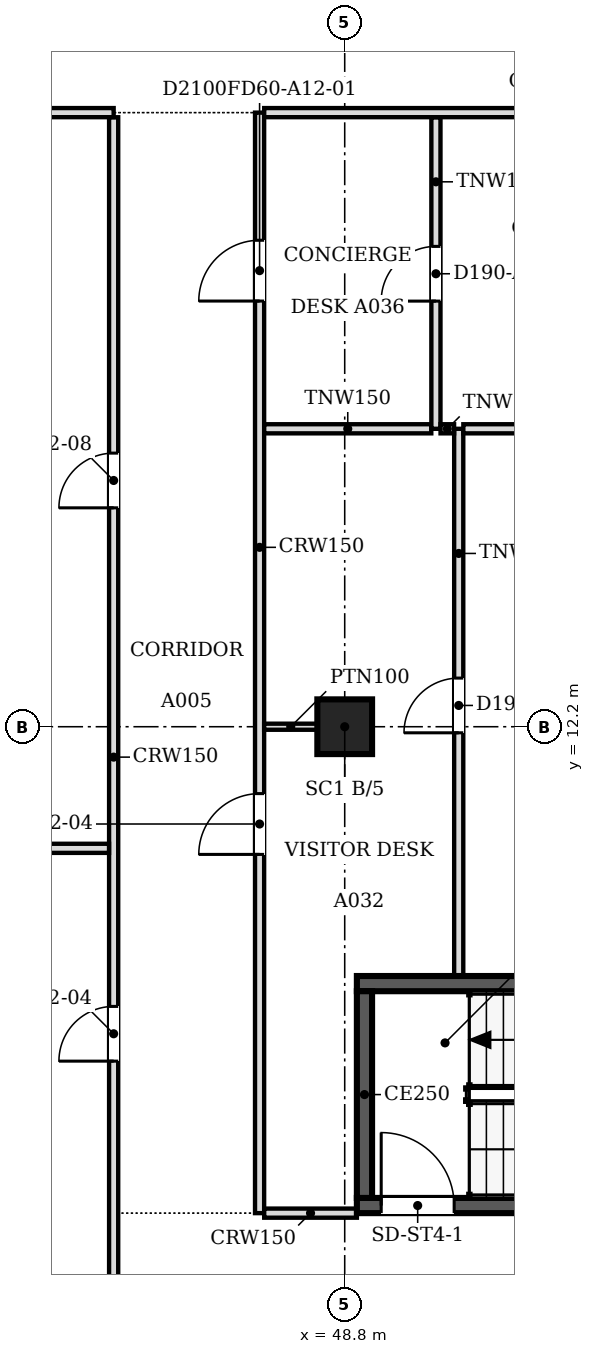
"""IFC4 building model, lengths in metres.
Left out: names, types, materials, properties, quantities, classifications, styles, units other than length and angle.
Written with IfcOpenShell. Run it as: python <this file> out.ifc"""

import sys

from ifc_helpers import new_model, si_unit, direction, frame, frame_2d, origin, origin_2d, place, context, subcontext, project, spatial, rectangle, extrude, source, transform, mapped, element, fill, save


model = new_model("IFC4")
c1 = context("Model", 3, precision=1e-05, world=origin(), true_north=direction((0.0, 1.0)))
c2 = subcontext(c1, "Body", "Model", "MODEL_VIEW")
j1 = project(units=[si_unit("LENGTHUNIT", "METRE"), si_unit("PLANEANGLEUNIT", "RADIAN")], contexts=[c1])
p1 = place(None, origin())
s1 = spatial("IfcSite", under=j1, at=p1, CompositionType="ELEMENT")
p2 = place(p1, origin())
s2 = spatial("IfcBuilding", under=s1, at=p2, CompositionType="ELEMENT")
p3 = place(p2, frame((0.0, 0.0, 135.4)))
s3 = spatial("IfcBuildingStorey", under=s2, at=p3, CompositionType="ELEMENT", Elevation=135.4)
p4 = place(p3, frame((48.8, 12.2, 0.0), z_axis=(0.0, 0.0, 1.0), x_axis=(1.0, 0.0, 0.0)))
e1 = element("IfcColumn", 1, at=p4, inside=s3, PredefinedType="COLUMN", context=c2, shape_type="SweptSolid", body=[
    extrude(rectangle(XDim=0.9, YDim=0.9, at=origin_2d()), origin(), (0.0, 0.0, 1.0), 3.6),
])
p5 = place(p3, frame((57.5, 4.325, 0.0), z_axis=(0.0, 0.0, 1.0), x_axis=(-1.0, 0.0, 0.0)))
e2 = element("IfcWall", 2, at=p5, inside=s3, PredefinedType="SOLIDWALL", context=c2, shape_type="SweptSolid", body=[
    extrude(rectangle(XDim=8.5, YDim=0.25, at=frame_2d((4.25, 0.0))), origin(), (0.0, 0.0, 1.0), 3.8),
])
m1 = source(origin(), c2, "Body", "SweptSolid", [
    extrude(rectangle(XDim=1.2, YDim=2.1, at=frame_2d((0.6, 1.05))), frame((0.0, 0.135, 0.0), z_axis=(0.0, -1.0, 0.0), x_axis=(1.0, 0.0, 0.0)), (0.0, 0.0, 1.0), 0.27),
])
p6 = place(p5, frame((6.9, 0.0, 0.0)))
e3 = element("IfcOpeningElement", 3, at=p6, cuts=e2, PredefinedType="OPENING", context=c2, shape_type="MappedRepresentation", body=[
    mapped(m1, transform((0.0, 0.0, 0.0), scale=1.0)),
])
p7 = place(p3, frame((49.125, 4.45, 0.0), z_axis=(0.0, 0.0, 1.0), x_axis=(0.0, 1.0, 0.0)))
e4 = element("IfcWall", 4, at=p7, inside=s3, PredefinedType="SOLIDWALL", context=c2, shape_type="SweptSolid", body=[
    extrude(rectangle(XDim=3.4, YDim=0.25, at=frame_2d((1.7, 0.0))), origin(), (0.0, 0.0, 1.0), 3.8),
])
p8 = place(p3, frame((49.0, 7.975, 0.0), z_axis=(0.0, 0.0, 1.0), x_axis=(1.0, 0.0, 0.0)))
e5 = element("IfcWall", 5, at=p8, inside=s3, PredefinedType="SOLIDWALL", context=c2, shape_type="SweptSolid", body=[
    extrude(rectangle(XDim=8.5, YDim=0.25, at=frame_2d((4.25, 0.0))), origin(), (0.0, 0.0, 1.0), 3.8),
])
p9 = place(p3, frame((45.0, 0.5, 0.0), z_axis=(0.0, 0.0, 1.0), x_axis=(0.0, 1.0, 0.0)))
e6 = element("IfcWall", 6, at=p9, inside=s3, PredefinedType="PARTITIONING", context=c2, shape_type="SweptSolid", body=[
    extrude(rectangle(XDim=21.724, YDim=0.15, at=frame_2d((10.862, 0.0))), origin(), (0.0, 0.0, 1.0), 3.067),
])
m2 = source(origin(), c2, "Body", "SweptSolid", [
    extrude(rectangle(XDim=0.9, YDim=2.1, at=frame_2d((0.45, 1.05))), frame((0.0, 0.085, 0.0), z_axis=(0.0, -1.0, 0.0), x_axis=(1.0, 0.0, 0.0)), (0.0, 0.0, 1.0), 0.17),
])
p10 = place(p9, frame((6.2, 0.0, 0.0)))
e7 = element("IfcOpeningElement", 7, at=p10, cuts=e6, PredefinedType="OPENING", context=c2, shape_type="MappedRepresentation", body=[
    mapped(m2, transform((0.0, 0.0, 0.0), scale=1.0)),
])
p11 = place(p9, frame((15.3, 0.0, 0.0)))
e8 = element("IfcOpeningElement", 8, at=p11, cuts=e6, PredefinedType="OPENING", context=c2, shape_type="MappedRepresentation", body=[
    mapped(m2, transform((0.0, 0.0, 0.0), scale=1.0)),
])
p12 = place(p3, frame((47.4, 22.3, 0.0), z_axis=(0.0, 0.0, 1.0), x_axis=(0.0, -1.0, 0.0)))
e9 = element("IfcWall", 9, at=p12, inside=s3, PredefinedType="PARTITIONING", context=c2, shape_type="SweptSolid", body=[
    extrude(rectangle(XDim=18.1, YDim=0.15, at=frame_2d((9.05, 0.0))), origin(), (0.0, 0.0, 1.0), 3.067),
])
m3 = source(origin(), c2, "Body", "SweptSolid", [
    extrude(rectangle(XDim=1.0, YDim=2.1, at=frame_2d((0.5, 1.05))), frame((0.0, 0.085, 0.0), z_axis=(0.0, -1.0, 0.0), x_axis=(1.0, 0.0, 0.0)), (0.0, 0.0, 1.0), 0.17),
])
p13 = place(p12, frame((2.099, 0.0, 0.0)))
e10 = element("IfcOpeningElement", 10, at=p13, cuts=e9, PredefinedType="OPENING", context=c2, shape_type="MappedRepresentation", body=[
    mapped(m3, transform((0.0, 0.0, 0.0), scale=1.0)),
])
p14 = place(p12, frame((11.2, 0.0, 0.0)))
e11 = element("IfcOpeningElement", 11, at=p14, cuts=e9, PredefinedType="OPENING", context=c2, shape_type="MappedRepresentation", body=[
    mapped(m3, transform((0.0, 0.0, 0.0), scale=1.0)),
])
p15 = place(p3, frame((47.476, 4.2, 0.0), z_axis=(0.0, 0.0, 1.0), x_axis=(1.0, 0.0, 0.0)))
e12 = element("IfcWall", 12, at=p15, inside=s3, PredefinedType="PARTITIONING", context=c2, shape_type="SweptSolid", body=[
    extrude(rectangle(XDim=1.524, YDim=0.15, at=frame_2d((0.762, 0.0))), origin(), (0.0, 0.0, 1.0), 3.067),
])
p16 = place(p3, frame((50.675, 17.1, 0.0), z_axis=(0.0, 0.0, 1.0), x_axis=(0.0, -1.0, 0.0)))
e13 = element("IfcWall", 13, at=p16, inside=s3, PredefinedType="PARTITIONING", context=c2, shape_type="SweptSolid", body=[
    extrude(rectangle(XDim=9.0, YDim=0.15, at=frame_2d((4.5, 0.0))), origin(), (0.0, 0.0, 1.0), 3.067),
])
p17 = place(p16, frame((4.1, 0.0, 0.0)))
e14 = element("IfcOpeningElement", 14, at=p17, cuts=e13, PredefinedType="OPENING", context=c2, shape_type="MappedRepresentation", body=[
    mapped(m2, transform((0.0, 0.0, 0.0), scale=1.0)),
])
p18 = place(p3, frame((27.075, 10.2, 0.0), z_axis=(0.0, 0.0, 1.0), x_axis=(1.0, 0.0, 0.0)))
e15 = element("IfcWall", 15, at=p18, inside=s3, PredefinedType="PARTITIONING", context=c2, shape_type="SweptSolid", body=[
    extrude(rectangle(XDim=17.849, YDim=0.15, at=frame_2d((8.925, 0.0))), origin(), (0.0, 0.0, 1.0), 3.067),
])
p19 = place(p3, frame((48.35, 12.2, 0.0), z_axis=(0.0, 0.0, 1.0), x_axis=(-1.0, 0.0, 0.0)))
e16 = element("IfcWall", 16, at=p19, inside=s3, PredefinedType="PARTITIONING", context=c2, shape_type="SweptSolid", body=[
    extrude(rectangle(XDim=0.875, YDim=0.1, at=frame_2d((0.438, 0.0))), origin(), (0.0, 0.0, 1.0), 3.067),
])
p20 = place(p3, frame((47.476, 17.1, 0.0), z_axis=(0.0, 0.0, 1.0), x_axis=(1.0, 0.0, 0.0)))
e17 = element("IfcWall", 17, at=p20, inside=s3, PredefinedType="PARTITIONING", context=c2, shape_type="SweptSolid", body=[
    extrude(rectangle(XDim=2.748, YDim=0.15, at=frame_2d((1.374, 0.0))), origin(), (0.0, 0.0, 1.0), 3.067),
])
p21 = place(p3, frame((50.3, 22.224, 0.0), z_axis=(0.0, 0.0, 1.0), x_axis=(0.0, -1.0, 0.0)))
e18 = element("IfcWall", 18, at=p21, inside=s3, PredefinedType="PARTITIONING", context=c2, shape_type="SweptSolid", body=[
    extrude(rectangle(XDim=5.124, YDim=0.15, at=frame_2d((2.562, 0.0))), origin(), (0.0, 0.0, 1.0), 3.067),
])
p22 = place(p21, frame((2.124, 0.0, 0.0)))
e19 = element("IfcOpeningElement", 19, at=p22, cuts=e18, PredefinedType="OPENING", context=c2, shape_type="MappedRepresentation", body=[
    mapped(m2, transform((0.0, 0.0, 0.0), scale=1.0)),
])
p23 = place(p3, frame((50.376, 17.1, 0.0), z_axis=(0.0, 0.0, 1.0), x_axis=(1.0, 0.0, 0.0)))
e20 = element("IfcWall", 20, at=p23, inside=s3, PredefinedType="PARTITIONING", context=c2, shape_type="SweptSolid", body=[
    extrude(rectangle(XDim=0.223, YDim=0.15, at=frame_2d((0.112, 0.0))), origin(), (0.0, 0.0, 1.0), 3.067),
])
p24 = place(p3, frame((50.751, 17.1, 0.0), z_axis=(0.0, 0.0, 1.0), x_axis=(1.0, 0.0, 0.0)))
e21 = element("IfcWall", 21, at=p24, inside=s3, PredefinedType="PARTITIONING", context=c2, shape_type="SweptSolid", body=[
    extrude(rectangle(XDim=9.749, YDim=0.15, at=frame_2d((4.875, 0.0))), origin(), (0.0, 0.0, 1.0), 3.067),
])
p25 = place(p3, frame((30.5, 22.3, 0.0), z_axis=(0.0, 0.0, 1.0), x_axis=(1.0, 0.0, 0.0)))
e22 = element("IfcWall", 22, at=p25, inside=s3, PredefinedType="PARTITIONING", context=c2, shape_type="SweptSolid", body=[
    extrude(rectangle(XDim=14.5, YDim=0.15, at=frame_2d((7.25, 0.0))), origin(), (0.0, 0.0, 1.0), 3.067),
])
p26 = place(p3, frame((47.476, 22.3, 0.0), z_axis=(0.0, 0.0, 1.0), x_axis=(1.0, 0.0, 0.0)))
e23 = element("IfcWall", 23, at=p26, inside=s3, PredefinedType="PARTITIONING", context=c2, shape_type="SweptSolid", body=[
    extrude(rectangle(XDim=9.448, YDim=0.15, at=frame_2d((4.724, 0.0))), origin(), (0.0, 0.0, 1.0), 3.067),
])
m4 = source(origin(), c2, "Body", "SweptSolid", [
    extrude(rectangle(XDim=1.2, YDim=2.1, at=frame_2d((0.6, 1.05))), frame((0.0, 0.025, 0.0), z_axis=(0.0, -1.0, 0.0), x_axis=(1.0, 0.0, 0.0)), (0.0, 0.0, 1.0), 0.05),
])
p27 = place(p6, origin())
e24 = element("IfcDoor", 24, at=p27, inside=s3, OperationType="SINGLE_SWING_RIGHT", PredefinedType="DOOR", context=c2, shape_type="MappedRepresentation", body=[
    mapped(m4, transform((0.0, 0.0, 0.0), scale=1.0)),
])
fill(e3, e24)
m5 = source(origin(), c2, "Body", "SweptSolid", [
    extrude(rectangle(XDim=0.9, YDim=2.1, at=frame_2d((0.45, 1.05))), frame((0.0, 0.025, 0.0), z_axis=(0.0, -1.0, 0.0), x_axis=(1.0, 0.0, 0.0)), (0.0, 0.0, 1.0), 0.05),
])
p28 = place(p22, origin())
e25 = element("IfcDoor", 25, at=p28, inside=s3, OperationType="SINGLE_SWING_RIGHT", PredefinedType="DOOR", context=c2, shape_type="MappedRepresentation", body=[
    mapped(m5, transform((0.0, 0.0, 0.0), scale=1.0)),
])
fill(e19, e25)
m6 = source(origin(), c2, "Body", "SweptSolid", [
    extrude(rectangle(XDim=1.0, YDim=2.1, at=frame_2d((0.5, 1.05))), frame((0.0, 0.025, 0.0), z_axis=(0.0, -1.0, 0.0), x_axis=(1.0, 0.0, 0.0)), (0.0, 0.0, 1.0), 0.05),
])
p29 = place(p13, origin())
e26 = element("IfcDoor", 26, at=p29, inside=s3, OperationType="SINGLE_SWING_RIGHT", PredefinedType="DOOR", context=c2, shape_type="MappedRepresentation", body=[
    mapped(m6, transform((0.0, 0.0, 0.0), scale=1.0)),
])
fill(e10, e26)
p30 = place(p10, origin())
e27 = element("IfcDoor", 27, at=p30, inside=s3, OperationType="SINGLE_SWING_LEFT", PredefinedType="DOOR", context=c2, shape_type="MappedRepresentation", body=[
    mapped(m5, transform((0.0, 0.0, 0.0), scale=1.0)),
])
fill(e7, e27)
p31 = place(p17, origin())
e28 = element("IfcDoor", 28, at=p31, inside=s3, OperationType="SINGLE_SWING_RIGHT", PredefinedType="DOOR", context=c2, shape_type="MappedRepresentation", body=[
    mapped(m5, transform((0.0, 0.0, 0.0), scale=1.0)),
])
fill(e14, e28)
p32 = place(p11, origin())
e29 = element("IfcDoor", 29, at=p32, inside=s3, OperationType="SINGLE_SWING_LEFT", PredefinedType="DOOR", context=c2, shape_type="MappedRepresentation", body=[
    mapped(m5, transform((0.0, 0.0, 0.0), scale=1.0)),
])
fill(e8, e29)
p33 = place(p14, origin())
e30 = element("IfcDoor", 30, at=p33, inside=s3, OperationType="SINGLE_SWING_RIGHT", PredefinedType="DOOR", context=c2, shape_type="MappedRepresentation", body=[
    mapped(m6, transform((0.0, 0.0, 0.0), scale=1.0)),
])
fill(e11, e30)
save(model, sys.argv[1])
